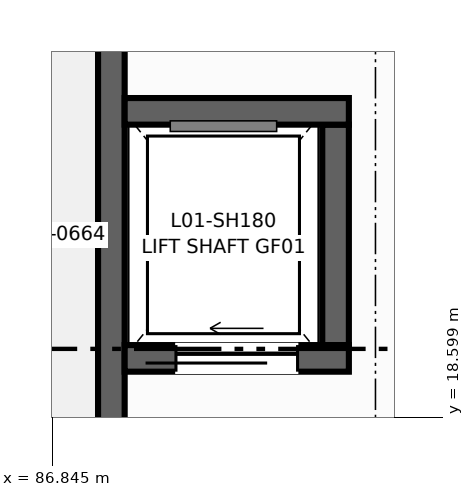
"""IFC4 building model, lengths in metres.
Left out: names, types, materials, properties, quantities, classifications, styles, units other than length and angle.
Written with IfcOpenShell. Run it as: python <this file> out.ifc"""

import sys

from ifc_helpers import new_model, si_unit, direction, frame, frame_2d, origin, place, context, subcontext, project, spatial, rectangle, extrude, element, fill, save


model = new_model("IFC4")
c1 = context("Model", 3, precision=1e-05, world=origin(), true_north=direction((0.0, 1.0)))
c2 = subcontext(c1, "Body", "Model", "MODEL_VIEW")
j1 = project(units=[si_unit("LENGTHUNIT", "METRE"), si_unit("PLANEANGLEUNIT", "RADIAN")], contexts=[c1])
p1 = place(None, origin())
s1 = spatial("IfcSite", under=j1, at=p1, CompositionType="ELEMENT")
p2 = place(p1, origin())
s2 = spatial("IfcBuilding", under=s1, at=p2, CompositionType="ELEMENT")
p3 = place(p2, frame((0.0, 0.0, 4.5)))
s3 = spatial("IfcBuildingStorey", under=s2, at=p3, CompositionType="ELEMENT", Elevation=4.5)
p4 = place(p3, frame((87.625, 18.5, 0.0), z_axis=(0.0, 0.0, 1.0), x_axis=(0.0, 1.0, 0.0)))
e1 = element("IfcWall", 1, at=p4, inside=s3, PredefinedType="SHEAR", context=c2, shape_type="SweptSolid", body=[
    extrude(rectangle(XDim=5.0, YDim=0.35, at=frame_2d((2.5, 0.0))), origin(), (0.0, 0.0, 1.0), 4.25),
])
p5 = place(p3, frame((90.575, 19.55, 0.0), z_axis=(0.0, 0.0, 1.0), x_axis=(0.0, 1.0, 0.0)))
e2 = element("IfcWall", 2, at=p5, inside=s3, PredefinedType="SHEAR", context=c2, shape_type="SweptSolid", body=[
    extrude(rectangle(XDim=2.9, YDim=0.35, at=frame_2d((1.45, 0.0))), origin(), (0.0, 0.0, 1.0), 4.25),
])
p6 = place(p3, frame((87.8, 19.375, 0.0), z_axis=(0.0, 0.0, 1.0), x_axis=(1.0, 0.0, 0.0)))
e3 = element("IfcWall", 3, at=p6, inside=s3, PredefinedType="SHEAR", context=c2, shape_type="SweptSolid", body=[
    extrude(rectangle(XDim=2.95, YDim=0.35, at=frame_2d((1.475, 0.0))), origin(), (0.0, 0.0, 1.0), 4.25),
])
p7 = place(p6, frame((0.675, 0.0, 0.0)))
e4 = element("IfcOpeningElement", 4, at=p7, cuts=e3, PredefinedType="OPENING", context=c2, shape_type="SweptSolid", body=[
    extrude(rectangle(XDim=1.6, YDim=2.35, at=frame_2d((0.8, 1.175))), frame((0.0, 0.185, 0.0), z_axis=(0.0, -1.0, 0.0), x_axis=(1.0, 0.0, 0.0)), (0.0, 0.0, 1.0), 0.37),
])
p8 = place(p3, frame((87.8, 22.625, 0.0), z_axis=(0.0, 0.0, 1.0), x_axis=(1.0, 0.0, 0.0)))
e5 = element("IfcWall", 5, at=p8, inside=s3, PredefinedType="SHEAR", context=c2, shape_type="SweptSolid", body=[
    extrude(rectangle(XDim=2.95, YDim=0.35, at=frame_2d((1.475, 0.0))), origin(), (0.0, 0.0, 1.0), 4.25),
])
p9 = place(p7, origin())
e6 = element("IfcDoor", 6, at=p9, inside=s3, OperationType="SLIDING_TO_LEFT", PredefinedType="DOOR", context=c2, shape_type="SweptSolid", body=[
    extrude(rectangle(XDim=1.6, YDim=2.35, at=frame_2d((0.8, 1.175))), frame((0.0, 0.025, 0.0), z_axis=(0.0, -1.0, 0.0), x_axis=(1.0, 0.0, 0.0)), (0.0, 0.0, 1.0), 0.05),
])
fill(e4, e6)
save(model, sys.argv[1])
